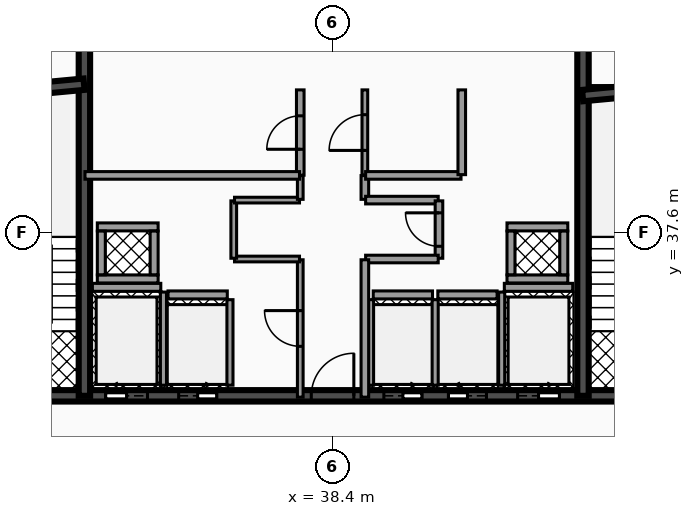
"""IFC4 building model, lengths in metres.
Left out: names, types, materials, properties, quantities, classifications, styles, units other than length and angle.
Written with IfcOpenShell. Run it as: python <this file> out.ifc"""

import sys

from ifc_helpers import new_model, si_unit, direction, frame, frame_2d, origin, place, context, subcontext, project, spatial, rectangle, extrude, element, fill, save


model = new_model("IFC4")
c1 = context("Model", 3, precision=1e-05, world=origin(), true_north=direction((0.0, 1.0)))
c2 = subcontext(c1, "Body", "Model", "MODEL_VIEW")
j1 = project(units=[si_unit("LENGTHUNIT", "METRE"), si_unit("PLANEANGLEUNIT", "RADIAN")], contexts=[c1])
p1 = place(None, origin())
s1 = spatial("IfcSite", under=j1, at=p1, CompositionType="ELEMENT")
p2 = place(p1, origin())
s2 = spatial("IfcBuilding", under=s1, at=p2, CompositionType="ELEMENT")
p3 = place(p2, frame((0.0, 0.0, 246.16)))
s3 = spatial("IfcBuildingStorey", under=s2, at=p3, CompositionType="ELEMENT", Elevation=246.16)
p4 = place(p3, frame((28.5, 33.3, 0.0), z_axis=(0.0, 0.0, 1.0), x_axis=(1.0, 0.0, 0.0)))
e1 = element("IfcWall", 1, at=p4, inside=s3, PredefinedType="SHEAR", context=c2, shape_type="SweptSolid", body=[
    extrude(rectangle(XDim=19.86, YDim=0.3, at=frame_2d((9.93, 0.0))), origin(), (0.0, 0.0, 1.0), 3.18),
])
p5 = place(p4, frame((3.93, 0.0, 0.0)))
e2 = element("IfcOpeningElement", 2, at=p5, cuts=e1, PredefinedType="OPENING", context=c2, shape_type="SweptSolid", body=[
    extrude(rectangle(XDim=1.1, YDim=2.15, at=frame_2d((0.55, 1.075))), frame((0.0, 0.16, 0.0), z_axis=(0.0, -1.0, 0.0), x_axis=(1.0, 0.0, 0.0)), (0.0, 0.0, 1.0), 0.32),
])
p6 = place(p4, frame((14.77, 0.0, 0.0)))
e3 = element("IfcOpeningElement", 3, at=p6, cuts=e1, PredefinedType="OPENING", context=c2, shape_type="SweptSolid", body=[
    extrude(rectangle(XDim=1.1, YDim=2.15, at=frame_2d((0.55, 1.075))), frame((0.0, 0.16, 0.0), z_axis=(0.0, -1.0, 0.0), x_axis=(1.0, 0.0, 0.0)), (0.0, 0.0, 1.0), 0.32),
])
p7 = place(p4, frame((11.25, 0.0, 0.0)))
e4 = element("IfcOpeningElement", 4, at=p7, cuts=e1, PredefinedType="OPENING", context=c2, shape_type="SweptSolid", body=[
    extrude(rectangle(XDim=1.0, YDim=2.1, at=frame_2d((0.5, 1.05))), frame((0.0, 0.16, 0.0), z_axis=(0.0, -1.0, 0.0), x_axis=(1.0, 0.0, 0.0)), (0.0, 0.0, 1.0), 0.32),
])
p8 = place(p4, frame((12.95, 0.0, 0.0)))
e5 = element("IfcOpeningElement", 5, at=p8, cuts=e1, PredefinedType="OPENING", context=c2, shape_type="SweptSolid", body=[
    extrude(rectangle(XDim=1.0, YDim=2.1, at=frame_2d((0.5, 1.05))), frame((0.0, 0.16, 0.0), z_axis=(0.0, -1.0, 0.0), x_axis=(1.0, 0.0, 0.0)), (0.0, 0.0, 1.0), 0.32),
])
p9 = place(p4, frame((5.85, 0.0, 0.0)))
e6 = element("IfcOpeningElement", 6, at=p9, cuts=e1, PredefinedType="OPENING", context=c2, shape_type="SweptSolid", body=[
    extrude(rectangle(XDim=1.0, YDim=2.1, at=frame_2d((0.5, 1.05))), frame((0.0, 0.16, 0.0), z_axis=(0.0, -1.0, 0.0), x_axis=(1.0, 0.0, 0.0)), (0.0, 0.0, 1.0), 0.32),
])
p10 = place(p4, frame((1.21, 0.0, 0.0)))
e7 = element("IfcOpeningElement", 7, at=p10, cuts=e1, PredefinedType="OPENING", context=c2, shape_type="SweptSolid", body=[
    extrude(rectangle(XDim=1.1, YDim=2.2, at=frame_2d((0.55, 1.1))), frame((0.0, 0.16, 0.0), z_axis=(0.0, -1.0, 0.0), x_axis=(1.0, 0.0, 0.0)), (0.0, 0.0, 1.0), 0.32),
])
p11 = place(p4, frame((9.34, 0.0, 0.0)))
e8 = element("IfcOpeningElement", 8, at=p11, cuts=e1, PredefinedType="OPENING", context=c2, shape_type="SweptSolid", body=[
    extrude(rectangle(XDim=1.12, YDim=2.05, at=frame_2d((0.56, 1.025))), frame((0.0, 0.16, 0.0), z_axis=(0.0, -1.0, 0.0), x_axis=(1.0, 0.0, 0.0)), (0.0, 0.0, 1.0), 0.32),
])
p12 = place(p4, frame((17.55, 0.0, 0.0)))
e9 = element("IfcOpeningElement", 9, at=p12, cuts=e1, PredefinedType="OPENING", context=c2, shape_type="SweptSolid", body=[
    extrude(rectangle(XDim=1.1, YDim=2.2, at=frame_2d((0.55, 1.1))), frame((0.0, 0.16, 0.0), z_axis=(0.0, -1.0, 0.0), x_axis=(1.0, 0.0, 0.0)), (0.0, 0.0, 1.0), 0.32),
])
for number, where, z_axis, x_axis in (
    (10, (31.87, 33.3, 0.0), (0.0, 0.0, 1.0), (0.0, 1.0, 0.0)),
    (11, (44.99, 33.3, 0.0), (0.0, 0.0, 1.0), (0.0, 1.0, 0.0)),
):
    element("IfcWall", number, at=place(p3, frame(where, z_axis=z_axis, x_axis=x_axis)), inside=s3, PredefinedType="SHEAR", context=c2, shape_type="SweptSolid", body=[
        extrude(rectangle(XDim=10.1, YDim=0.3, at=frame_2d((5.05, 0.0))), origin(), (0.0, 0.0, 1.0), 3.18),
    ])
p13 = place(p3, frame((28.64, 41.2, 0.0), z_axis=(0.0, 0.0, 1.0), x_axis=(0.995687118776, 0.092774789157, 0.0)))
e12 = element("IfcWall", 12, at=p13, inside=s3, PredefinedType="SHEAR", context=c2, shape_type="SweptSolid", body=[
    extrude(rectangle(XDim=3.234, YDim=0.3, at=frame_2d((1.617, 0.0))), origin(), (0.0, 0.0, 1.0), 3.18),
])
p14 = place(p3, frame((44.98, 41.2, 0.0), z_axis=(0.0, 0.0, 1.0), x_axis=(0.995686468965, 0.09278176286, 0.0)))
e13 = element("IfcWall", 13, at=p14, inside=s3, PredefinedType="SHEAR", context=c2, shape_type="SweptSolid", body=[
    extrude(rectangle(XDim=3.234, YDim=0.3, at=frame_2d((1.617, 0.0))), origin(), (0.0, 0.0, 1.0), 3.18),
])
p15 = place(p3, frame((32.08, 36.155, 0.0), z_axis=(0.0, 0.0, 1.0), x_axis=(1.0, 0.0, 0.0)))
e14 = element("IfcWall", 14, at=p15, inside=s3, PredefinedType="SOLIDWALL", context=c2, shape_type="SweptSolid", body=[
    extrude(rectangle(XDim=1.8, YDim=0.21, at=frame_2d((0.9, 0.0))), origin(), (0.0, 0.0, 1.0), 3.18),
])
p16 = place(p3, frame((33.95, 33.58, 0.0), z_axis=(0.0, 0.0, 1.0), x_axis=(0.0, 1.0, 0.0)))
e15 = element("IfcWall", 15, at=p16, inside=s3, PredefinedType="SOLIDWALL", context=c2, shape_type="SweptSolid", body=[
    extrude(rectangle(XDim=2.45, YDim=0.16, at=frame_2d((1.225, 0.0))), origin(), (0.0, 0.0, 1.0), 3.18),
])
p17 = place(p3, frame((42.92, 36.155, 0.0), z_axis=(0.0, 0.0, 1.0), x_axis=(1.0, 0.0, 0.0)))
e16 = element("IfcWall", 16, at=p17, inside=s3, PredefinedType="SOLIDWALL", context=c2, shape_type="SweptSolid", body=[
    extrude(rectangle(XDim=1.8, YDim=0.21, at=frame_2d((0.9, 0.0))), origin(), (0.0, 0.0, 1.0), 3.18),
])
p18 = place(p3, frame((42.85, 33.58, 0.0), z_axis=(0.0, 0.0, 1.0), x_axis=(0.0, 1.0, 0.0)))
e17 = element("IfcWall", 17, at=p18, inside=s3, PredefinedType="SOLIDWALL", context=c2, shape_type="SweptSolid", body=[
    extrude(rectangle(XDim=2.45, YDim=0.16, at=frame_2d((1.225, 0.0))), origin(), (0.0, 0.0, 1.0), 3.18),
])
p19 = place(p3, frame((39.47, 35.955, 0.0), z_axis=(0.0, 0.0, 1.0), x_axis=(1.0, 0.0, 0.0)))
e18 = element("IfcWall", 18, at=p19, inside=s3, PredefinedType="SOLIDWALL", context=c2, shape_type="SweptSolid", body=[
    extrude(rectangle(XDim=1.56, YDim=0.21, at=frame_2d((0.78, 0.0))), origin(), (0.0, 0.0, 1.0), 3.18),
])
for number, where, z_axis, x_axis in (
    (19, (39.4, 33.58, 0.0), (0.0, 0.0, 1.0), (0.0, 1.0, 0.0)),
    (20, (41.1, 33.58, 0.0), (0.0, 0.0, 1.0), (0.0, 1.0, 0.0)),
):
    element("IfcWall", number, at=place(p3, frame(where, z_axis=z_axis, x_axis=x_axis)), inside=s3, PredefinedType="SOLIDWALL", context=c2, shape_type="SweptSolid", body=[
        extrude(rectangle(XDim=2.25, YDim=0.16, at=frame_2d((1.125, 0.0))), origin(), (0.0, 0.0, 1.0), 3.18),
    ])
p20 = place(p3, frame((41.17, 35.955, 0.0), z_axis=(0.0, 0.0, 1.0), x_axis=(1.0, 0.0, 0.0)))
e21 = element("IfcWall", 21, at=p20, inside=s3, PredefinedType="SOLIDWALL", context=c2, shape_type="SweptSolid", body=[
    extrude(rectangle(XDim=1.56, YDim=0.21, at=frame_2d((0.78, 0.0))), origin(), (0.0, 0.0, 1.0), 3.18),
])
p21 = place(p3, frame((34.07, 35.955, 0.0), z_axis=(0.0, 0.0, 1.0), x_axis=(1.0, 0.0, 0.0)))
e22 = element("IfcWall", 22, at=p21, inside=s3, PredefinedType="SOLIDWALL", context=c2, shape_type="SweptSolid", body=[
    extrude(rectangle(XDim=1.56, YDim=0.21, at=frame_2d((0.78, 0.0))), origin(), (0.0, 0.0, 1.0), 3.18),
])
p22 = place(p3, frame((35.7, 33.58, 0.0), z_axis=(0.0, 0.0, 1.0), x_axis=(0.0, 1.0, 0.0)))
e23 = element("IfcWall", 23, at=p22, inside=s3, PredefinedType="SOLIDWALL", context=c2, shape_type="SweptSolid", body=[
    extrude(rectangle(XDim=2.25, YDim=0.16, at=frame_2d((1.125, 0.0))), origin(), (0.0, 0.0, 1.0), 3.18),
])
for number, where, z_axis, x_axis in (
    (24, (32.21, 36.375, 0.0), (0.0, 0.0, 1.0), (1.0, 0.0, 0.0)),
    (25, (32.21, 37.745, 0.0), (0.0, 0.0, 1.0), (1.0, 0.0, 0.0)),
):
    element("IfcWall", number, at=place(p3, frame(where, z_axis=z_axis, x_axis=x_axis)), inside=s3, PredefinedType="SOLIDWALL", context=c2, shape_type="SweptSolid", body=[
        extrude(rectangle(XDim=1.6, YDim=0.21, at=frame_2d((0.8, 0.0))), origin(), (0.0, 0.0, 1.0), 3.18),
    ])
for number, where, z_axis, x_axis in (
    (26, (32.315, 36.485, 0.0), (0.0, 0.0, 1.0), (0.0, 1.0, 0.0)),
    (27, (33.705, 36.485, 0.0), (0.0, 0.0, 1.0), (0.0, 1.0, 0.0)),
):
    element("IfcWall", number, at=place(p3, frame(where, z_axis=z_axis, x_axis=x_axis)), inside=s3, PredefinedType="SOLIDWALL", context=c2, shape_type="SweptSolid", body=[
        extrude(rectangle(XDim=1.15, YDim=0.21, at=frame_2d((0.575, 0.0))), origin(), (0.0, 0.0, 1.0), 3.18),
    ])
for number, where, z_axis, x_axis in (
    (28, (42.99, 36.375, 0.0), (0.0, 0.0, 1.0), (1.0, 0.0, 0.0)),
    (29, (42.99, 37.745, 0.0), (0.0, 0.0, 1.0), (1.0, 0.0, 0.0)),
):
    element("IfcWall", number, at=place(p3, frame(where, z_axis=z_axis, x_axis=x_axis)), inside=s3, PredefinedType="SOLIDWALL", context=c2, shape_type="SweptSolid", body=[
        extrude(rectangle(XDim=1.6, YDim=0.21, at=frame_2d((0.8, 0.0))), origin(), (0.0, 0.0, 1.0), 3.18),
    ])
for number, where, z_axis, x_axis in (
    (30, (43.095, 36.485, 0.0), (0.0, 0.0, 1.0), (0.0, 1.0, 0.0)),
    (31, (44.485, 36.485, 0.0), (0.0, 0.0, 1.0), (0.0, 1.0, 0.0)),
):
    element("IfcWall", number, at=place(p3, frame(where, z_axis=z_axis, x_axis=x_axis)), inside=s3, PredefinedType="SOLIDWALL", context=c2, shape_type="SweptSolid", body=[
        extrude(rectangle(XDim=1.15, YDim=0.21, at=frame_2d((0.575, 0.0))), origin(), (0.0, 0.0, 1.0), 3.18),
    ])
p23 = place(p3, frame((37.55, 33.265, 0.0), z_axis=(0.0, 0.0, 1.0), x_axis=(0.0, 1.0, 0.0)))
e32 = element("IfcWall", 32, at=p23, inside=s3, PredefinedType="PARTITIONING", context=c2, shape_type="SweptSolid", body=[
    extrude(rectangle(XDim=3.615, YDim=0.15, at=frame_2d((1.808, 0.0))), origin(), (0.0, 0.0, 1.0), 2.235),
])
p24 = place(p23, frame((1.337, 0.0, 0.0)))
e33 = element("IfcOpeningElement", 33, at=p24, cuts=e32, PredefinedType="OPENING", context=c2, shape_type="SweptSolid", body=[
    extrude(rectangle(XDim=0.94, YDim=2.05, at=frame_2d((0.47, 1.025))), frame((0.0, 0.085, 0.0), z_axis=(0.0, -1.0, 0.0), x_axis=(1.0, 0.0, 0.0)), (0.0, 0.0, 1.0), 0.17),
])
p25 = place(p3, frame((35.82, 36.9, 0.0), z_axis=(0.0, 0.0, 1.0), x_axis=(1.0, 0.0, 0.0)))
e34 = element("IfcWall", 34, at=p25, inside=s3, PredefinedType="PARTITIONING", context=c2, shape_type="SweptSolid", body=[
    extrude(rectangle(XDim=1.71, YDim=0.15, at=frame_2d((0.855, 0.0))), origin(), (0.0, 0.0, 1.0), 2.235),
])
p26 = place(p3, frame((35.8, 36.92, 0.0), z_axis=(0.0, 0.0, 1.0), x_axis=(0.0, 1.0, 0.0)))
e35 = element("IfcWall", 35, at=p26, inside=s3, PredefinedType="PARTITIONING", context=c2, shape_type="SweptSolid", body=[
    extrude(rectangle(XDim=1.51, YDim=0.15, at=frame_2d((0.755, 0.0))), origin(), (0.0, 0.0, 1.0), 2.235),
])
p27 = place(p3, frame((35.82, 38.45, 0.0), z_axis=(0.0, 0.0, 1.0), x_axis=(1.0, 0.0, 0.0)))
e36 = element("IfcWall", 36, at=p27, inside=s3, PredefinedType="PARTITIONING", context=c2, shape_type="SweptSolid", body=[
    extrude(rectangle(XDim=1.71, YDim=0.15, at=frame_2d((0.855, 0.0))), origin(), (0.0, 0.0, 1.0), 2.235),
])
p28 = place(p3, frame((37.55, 38.47, 0.0), z_axis=(0.0, 0.0, 1.0), x_axis=(0.0, 1.0, 0.0)))
e37 = element("IfcWall", 37, at=p28, inside=s3, PredefinedType="PARTITIONING", context=c2, shape_type="SweptSolid", body=[
    extrude(rectangle(XDim=0.625, YDim=0.15, at=frame_2d((0.312, 0.0))), origin(), (0.0, 0.0, 1.0), 2.235),
])
p29 = place(p3, frame((37.55, 39.105, 0.0), z_axis=(0.0, 0.0, 1.0), x_axis=(0.0, 1.0, 0.0)))
e38 = element("IfcWall", 38, at=p29, inside=s3, PredefinedType="PARTITIONING", context=c2, shape_type="SweptSolid", body=[
    extrude(rectangle(XDim=2.245, YDim=0.2, at=frame_2d((1.123, 0.0))), origin(), (0.0, 0.0, 1.0), 2.235),
])
p30 = place(p29, frame((0.683, 0.0, 0.0)))
e39 = element("IfcOpeningElement", 39, at=p30, cuts=e38, PredefinedType="OPENING", context=c2, shape_type="SweptSolid", body=[
    extrude(rectangle(XDim=0.88, YDim=2.05, at=frame_2d((0.44, 1.025))), frame((0.0, 0.11, 0.0), z_axis=(0.0, -1.0, 0.0), x_axis=(1.0, 0.0, 0.0)), (0.0, 0.0, 1.0), 0.22),
])
p31 = place(p3, frame((39.25, 38.47, 0.0), z_axis=(0.0, 0.0, 1.0), x_axis=(0.0, 1.0, 0.0)))
e40 = element("IfcWall", 40, at=p31, inside=s3, PredefinedType="PARTITIONING", context=c2, shape_type="SweptSolid", body=[
    extrude(rectangle(XDim=0.625, YDim=0.2, at=frame_2d((0.312, 0.0))), origin(), (0.0, 0.0, 1.0), 2.235),
])
p32 = place(p3, frame((39.27, 38.45, 0.0), z_axis=(0.0, 0.0, 1.0), x_axis=(1.0, 0.0, 0.0)))
e41 = element("IfcWall", 41, at=p32, inside=s3, PredefinedType="PARTITIONING", context=c2, shape_type="SweptSolid", body=[
    extrude(rectangle(XDim=1.91, YDim=0.2, at=frame_2d((0.955, 0.0))), origin(), (0.0, 0.0, 1.0), 2.235),
])
p33 = place(p3, frame((41.2, 36.92, 0.0), z_axis=(0.0, 0.0, 1.0), x_axis=(0.0, 1.0, 0.0)))
e42 = element("IfcWall", 42, at=p33, inside=s3, PredefinedType="PARTITIONING", context=c2, shape_type="SweptSolid", body=[
    extrude(rectangle(XDim=1.51, YDim=0.2, at=frame_2d((0.755, 0.0))), origin(), (0.0, 0.0, 1.0), 2.235),
])
p34 = place(p33, frame((0.315, 0.0, 0.0)))
e43 = element("IfcOpeningElement", 43, at=p34, cuts=e42, PredefinedType="OPENING", context=c2, shape_type="SweptSolid", body=[
    extrude(rectangle(XDim=0.88, YDim=2.05, at=frame_2d((0.44, 1.025))), frame((0.0, 0.11, 0.0), z_axis=(0.0, -1.0, 0.0), x_axis=(1.0, 0.0, 0.0)), (0.0, 0.0, 1.0), 0.22),
])
p35 = place(p3, frame((39.27, 36.9, 0.0), z_axis=(0.0, 0.0, 1.0), x_axis=(1.0, 0.0, 0.0)))
e44 = element("IfcWall", 44, at=p35, inside=s3, PredefinedType="PARTITIONING", context=c2, shape_type="SweptSolid", body=[
    extrude(rectangle(XDim=1.91, YDim=0.2, at=frame_2d((0.955, 0.0))), origin(), (0.0, 0.0, 1.0), 2.235),
])
p36 = place(p3, frame((39.25, 33.265, 0.0), z_axis=(0.0, 0.0, 1.0), x_axis=(0.0, 1.0, 0.0)))
e45 = element("IfcWall", 45, at=p36, inside=s3, PredefinedType="PARTITIONING", context=c2, shape_type="SweptSolid", body=[
    extrude(rectangle(XDim=3.615, YDim=0.2, at=frame_2d((1.808, 0.0))), origin(), (0.0, 0.0, 1.0), 2.235),
])
p37 = place(p3, frame((39.25, 39.105, 0.0), z_axis=(0.0, 0.0, 1.0), x_axis=(0.0, 1.0, 0.0)))
e46 = element("IfcWall", 46, at=p37, inside=s3, PredefinedType="PARTITIONING", context=c2, shape_type="SweptSolid", body=[
    extrude(rectangle(XDim=2.245, YDim=0.15, at=frame_2d((1.123, 0.0))), origin(), (0.0, 0.0, 1.0), 2.235),
])
p38 = place(p37, frame((0.653, 0.0, 0.0)))
e47 = element("IfcOpeningElement", 47, at=p38, cuts=e46, PredefinedType="OPENING", context=c2, shape_type="SweptSolid", body=[
    extrude(rectangle(XDim=0.94, YDim=2.05, at=frame_2d((0.47, 1.025))), frame((0.0, 0.085, 0.0), z_axis=(0.0, -1.0, 0.0), x_axis=(1.0, 0.0, 0.0)), (0.0, 0.0, 1.0), 0.17),
])
p39 = place(p3, frame((31.885, 39.1, 0.0), z_axis=(0.0, 0.0, 1.0), x_axis=(1.0, 0.0, 0.0)))
e48 = element("IfcWall", 48, at=p39, inside=s3, PredefinedType="PARTITIONING", context=c2, shape_type="SweptSolid", body=[
    extrude(rectangle(XDim=5.645, YDim=0.2, at=frame_2d((2.823, 0.0))), origin(), (0.0, 0.0, 1.0), 2.235),
])
p40 = place(p3, frame((39.27, 39.1, 0.0), z_axis=(0.0, 0.0, 1.0), x_axis=(1.0, 0.0, 0.0)))
e49 = element("IfcWall", 49, at=p40, inside=s3, PredefinedType="PARTITIONING", context=c2, shape_type="SweptSolid", body=[
    extrude(rectangle(XDim=2.51, YDim=0.2, at=frame_2d((1.255, 0.0))), origin(), (0.0, 0.0, 1.0), 2.235),
])
p41 = place(p3, frame((41.8, 39.12, 0.0), z_axis=(0.0, 0.0, 1.0), x_axis=(0.0, 1.0, 0.0)))
e50 = element("IfcWall", 50, at=p41, inside=s3, PredefinedType="PARTITIONING", context=c2, shape_type="SweptSolid", body=[
    extrude(rectangle(XDim=2.23, YDim=0.2, at=frame_2d((1.115, 0.0))), origin(), (0.0, 0.0, 1.0), 2.235),
])
p42 = place(p5, origin())
e51 = element("IfcDoor", 51, at=p42, inside=s3, OperationType="SLIDING_TO_LEFT", PredefinedType="DOOR", context=c2, shape_type="SweptSolid", body=[
    extrude(rectangle(XDim=1.1, YDim=2.15, at=frame_2d((0.55, 1.075))), frame((0.0, 0.025, 0.0), z_axis=(0.0, -1.0, 0.0), x_axis=(1.0, 0.0, 0.0)), (0.0, 0.0, 1.0), 0.05),
])
fill(e2, e51)
p43 = place(p6, origin())
e52 = element("IfcDoor", 52, at=p43, inside=s3, OperationType="SLIDING_TO_RIGHT", PredefinedType="DOOR", context=c2, shape_type="SweptSolid", body=[
    extrude(rectangle(XDim=1.1, YDim=2.15, at=frame_2d((0.55, 1.075))), frame((0.0, 0.025, 0.0), z_axis=(0.0, -1.0, 0.0), x_axis=(1.0, 0.0, 0.0)), (0.0, 0.0, 1.0), 0.05),
])
fill(e3, e52)
p44 = place(p7, origin())
e53 = element("IfcDoor", 53, at=p44, inside=s3, OperationType="SLIDING_TO_RIGHT", PredefinedType="DOOR", context=c2, shape_type="SweptSolid", body=[
    extrude(rectangle(XDim=1.0, YDim=2.1, at=frame_2d((0.5, 1.05))), frame((0.0, 0.025, 0.0), z_axis=(0.0, -1.0, 0.0), x_axis=(1.0, 0.0, 0.0)), (0.0, 0.0, 1.0), 0.05),
])
fill(e4, e53)
p45 = place(p8, origin())
e54 = element("IfcDoor", 54, at=p45, inside=s3, OperationType="SLIDING_TO_LEFT", PredefinedType="DOOR", context=c2, shape_type="SweptSolid", body=[
    extrude(rectangle(XDim=1.0, YDim=2.1, at=frame_2d((0.5, 1.05))), frame((0.0, 0.025, 0.0), z_axis=(0.0, -1.0, 0.0), x_axis=(1.0, 0.0, 0.0)), (0.0, 0.0, 1.0), 0.05),
])
fill(e5, e54)
p46 = place(p9, origin())
e55 = element("IfcDoor", 55, at=p46, inside=s3, OperationType="SLIDING_TO_RIGHT", PredefinedType="DOOR", context=c2, shape_type="SweptSolid", body=[
    extrude(rectangle(XDim=1.0, YDim=2.1, at=frame_2d((0.5, 1.05))), frame((0.0, 0.025, 0.0), z_axis=(0.0, -1.0, 0.0), x_axis=(1.0, 0.0, 0.0)), (0.0, 0.0, 1.0), 0.05),
])
fill(e6, e55)
p47 = place(p11, origin())
e56 = element("IfcDoor", 56, at=p47, inside=s3, OperationType="SINGLE_SWING_RIGHT", PredefinedType="DOOR", context=c2, shape_type="SweptSolid", body=[
    extrude(rectangle(XDim=1.12, YDim=2.05, at=frame_2d((0.56, 1.025))), frame((0.0, 0.025, 0.0), z_axis=(0.0, -1.0, 0.0), x_axis=(1.0, 0.0, 0.0)), (0.0, 0.0, 1.0), 0.05),
])
fill(e8, e56)
p48 = place(p24, origin())
e57 = element("IfcDoor", 57, at=p48, inside=s3, OperationType="SINGLE_SWING_RIGHT", PredefinedType="DOOR", context=c2, shape_type="SweptSolid", body=[
    extrude(rectangle(XDim=0.94, YDim=2.05, at=frame_2d((0.47, 1.025))), frame((0.0, 0.025, 0.0), z_axis=(0.0, -1.0, 0.0), x_axis=(1.0, 0.0, 0.0)), (0.0, 0.0, 1.0), 0.05),
])
fill(e33, e57)
p49 = place(p30, origin())
e58 = element("IfcDoor", 58, at=p49, inside=s3, OperationType="SINGLE_SWING_LEFT", PredefinedType="DOOR", context=c2, shape_type="SweptSolid", body=[
    extrude(rectangle(XDim=0.88, YDim=2.05, at=frame_2d((0.44, 1.025))), frame((0.0, 0.025, 0.0), z_axis=(0.0, -1.0, 0.0), x_axis=(1.0, 0.0, 0.0)), (0.0, 0.0, 1.0), 0.05),
])
fill(e39, e58)
p50 = place(p34, origin())
e59 = element("IfcDoor", 59, at=p50, inside=s3, OperationType="SINGLE_SWING_RIGHT", PredefinedType="DOOR", context=c2, shape_type="SweptSolid", body=[
    extrude(rectangle(XDim=0.88, YDim=2.05, at=frame_2d((0.44, 1.025))), frame((0.0, 0.025, 0.0), z_axis=(0.0, -1.0, 0.0), x_axis=(1.0, 0.0, 0.0)), (0.0, 0.0, 1.0), 0.05),
])
fill(e43, e59)
p51 = place(p38, origin())
e60 = element("IfcDoor", 60, at=p51, inside=s3, OperationType="SINGLE_SWING_LEFT", PredefinedType="DOOR", context=c2, shape_type="SweptSolid", body=[
    extrude(rectangle(XDim=0.94, YDim=2.05, at=frame_2d((0.47, 1.025))), frame((0.0, 0.025, 0.0), z_axis=(0.0, -1.0, 0.0), x_axis=(1.0, 0.0, 0.0)), (0.0, 0.0, 1.0), 0.05),
])
fill(e47, e60)
save(model, sys.argv[1])
